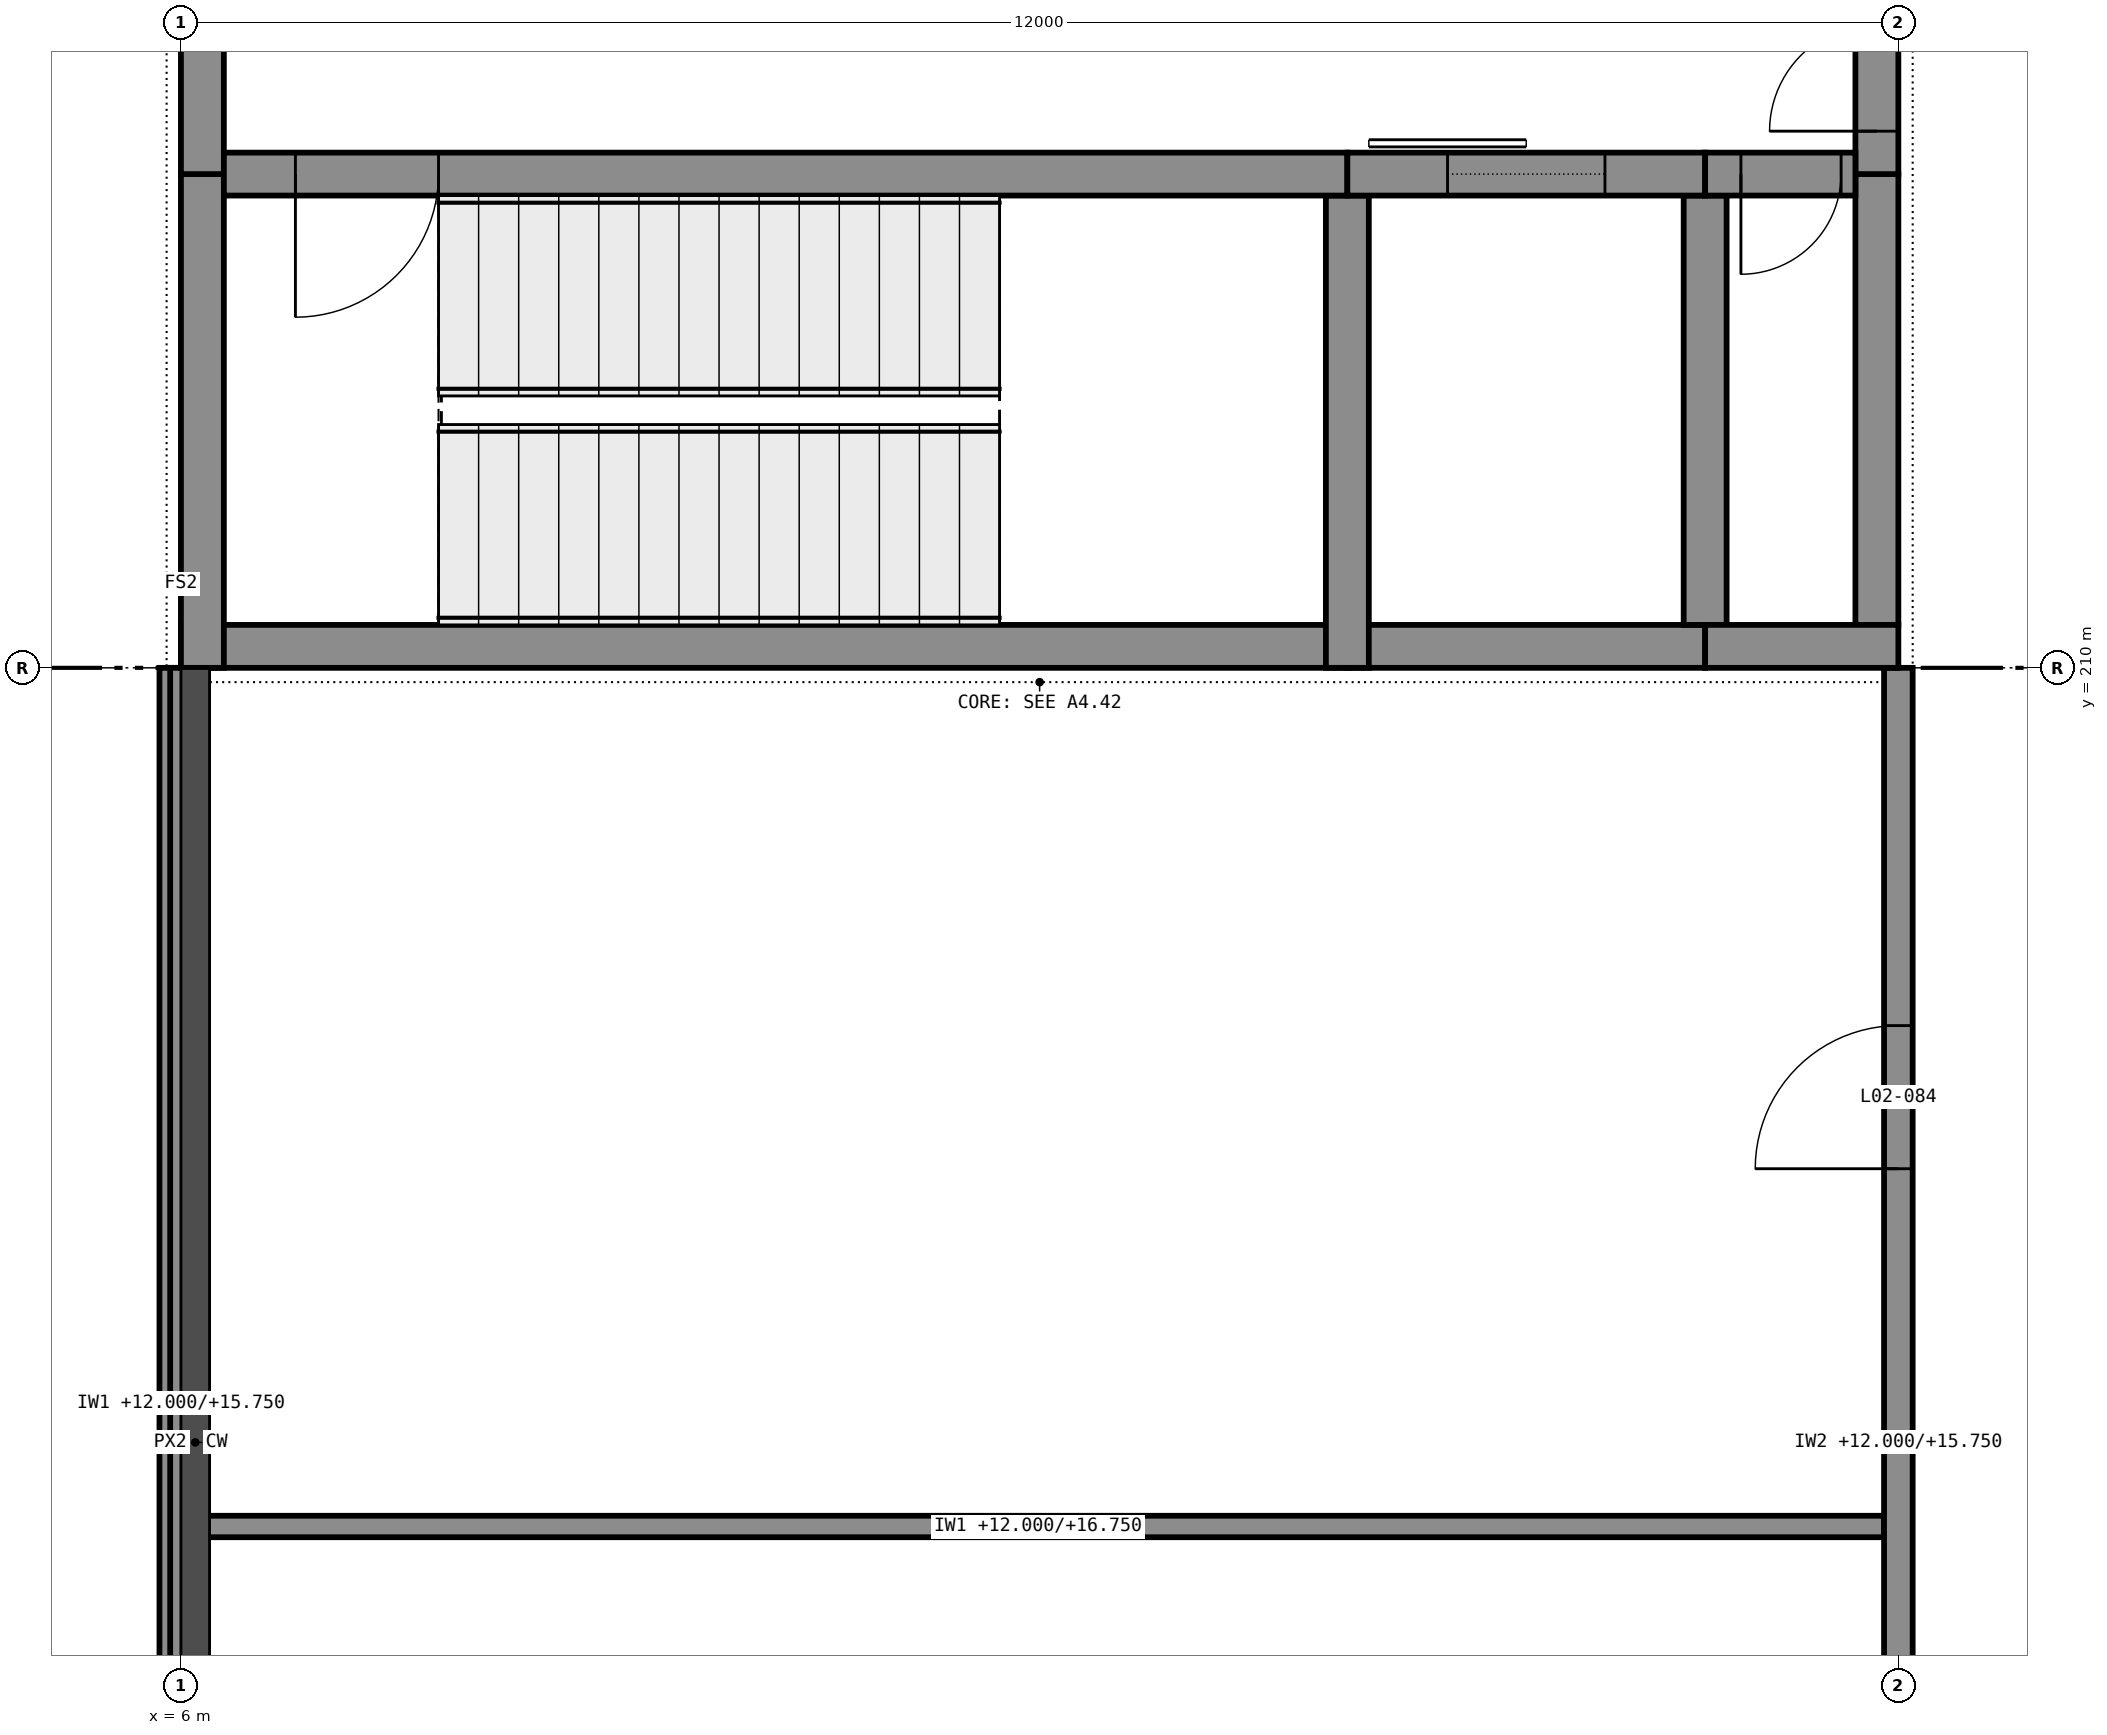
"""IFC4 building model, lengths in metres.
Left out: names, types, materials, properties, quantities, classifications, styles, units other than length and angle.
Written with IfcOpenShell. Run it as: python <this file> out.ifc"""

import sys

from ifc_helpers import new_model, si_unit, direction, frame, frame_2d, origin, place, context, subcontext, project, spatial, rectangle, extrude, element, fill, save


model = new_model("IFC4")
c1 = context("Model", 3, precision=1e-05, world=origin(), true_north=direction((0.0, 1.0)))
c2 = subcontext(c1, "Body", "Model", "MODEL_VIEW")
j1 = project(units=[si_unit("LENGTHUNIT", "METRE"), si_unit("PLANEANGLEUNIT", "RADIAN")], contexts=[c1])
p1 = place(None, origin())
s1 = spatial("IfcSite", under=j1, at=p1, CompositionType="ELEMENT")
p2 = place(p1, origin())
s2 = spatial("IfcBuilding", under=s1, at=p2, CompositionType="ELEMENT")
p3 = place(p2, frame((0.0, 0.0, 12.0)))
s3 = spatial("IfcBuildingStorey", under=s2, at=p3, CompositionType="ELEMENT", Elevation=12.0)
p4 = place(p3, frame((6.0, 210.15, 0.0), z_axis=(0.0, 0.0, 1.0), x_axis=(1.0, 0.0, 0.0)))
e1 = element("IfcWall", 1, at=p4, inside=s3, PredefinedType="SHEAR", context=c2, shape_type="SweptSolid", body=[
    extrude(rectangle(XDim=8.15, YDim=0.3, at=frame_2d((4.075, 0.0))), origin(), (0.0, 0.0, 1.0), 4.75),
])
p5 = place(p3, frame((14.15, 210.15, 0.0), z_axis=(0.0, 0.0, 1.0), x_axis=(1.0, 0.0, 0.0)))
e2 = element("IfcWall", 2, at=p5, inside=s3, PredefinedType="SHEAR", context=c2, shape_type="SweptSolid", body=[
    extrude(rectangle(XDim=2.5, YDim=0.3, at=frame_2d((1.25, 0.0))), origin(), (0.0, 0.0, 1.0), 4.75),
])
p6 = place(p3, frame((16.65, 210.15, 0.0), z_axis=(0.0, 0.0, 1.0), x_axis=(1.0, 0.0, 0.0)))
e3 = element("IfcWall", 3, at=p6, inside=s3, PredefinedType="SHEAR", context=c2, shape_type="SweptSolid", body=[
    extrude(rectangle(XDim=1.35, YDim=0.3, at=frame_2d((0.675, 0.0))), origin(), (0.0, 0.0, 1.0), 4.75),
])
p7 = place(p3, frame((6.3, 213.45, 0.0), z_axis=(0.0, 0.0, 1.0), x_axis=(1.0, 0.0, 0.0)))
e4 = element("IfcWall", 4, at=p7, inside=s3, PredefinedType="SHEAR", context=c2, shape_type="SweptSolid", body=[
    extrude(rectangle(XDim=7.85, YDim=0.3, at=frame_2d((3.925, 0.0))), origin(), (0.0, 0.0, 1.0), 4.75),
])
p8 = place(p7, frame((0.5, 0.0, 0.0)))
e5 = element("IfcOpeningElement", 5, at=p8, cuts=e4, PredefinedType="OPENING", context=c2, shape_type="SweptSolid", body=[
    extrude(rectangle(XDim=1.0, YDim=2.1, at=frame_2d((0.5, 1.05))), frame((0.0, 0.16, 0.0), z_axis=(0.0, -1.0, 0.0), x_axis=(1.0, 0.0, 0.0)), (0.0, 0.0, 1.0), 0.32),
])
p9 = place(p3, frame((14.15, 213.45, 0.0), z_axis=(0.0, 0.0, 1.0), x_axis=(1.0, 0.0, 0.0)))
e6 = element("IfcWall", 6, at=p9, inside=s3, PredefinedType="SHEAR", context=c2, shape_type="SweptSolid", body=[
    extrude(rectangle(XDim=2.5, YDim=0.3, at=frame_2d((1.25, 0.0))), origin(), (0.0, 0.0, 1.0), 4.75),
])
p10 = place(p9, frame((0.7, 0.0, 0.0)))
e7 = element("IfcOpeningElement", 7, at=p10, cuts=e6, PredefinedType="OPENING", context=c2, shape_type="SweptSolid", body=[
    extrude(rectangle(XDim=1.1, YDim=2.1, at=frame_2d((0.55, 1.05))), frame((0.0, 0.16, 0.0), z_axis=(0.0, -1.0, 0.0), x_axis=(1.0, 0.0, 0.0)), (0.0, 0.0, 1.0), 0.32),
])
p11 = place(p3, frame((16.65, 213.45, 0.0), z_axis=(0.0, 0.0, 1.0), x_axis=(1.0, 0.0, 0.0)))
e8 = element("IfcWall", 8, at=p11, inside=s3, PredefinedType="SHEAR", context=c2, shape_type="SweptSolid", body=[
    extrude(rectangle(XDim=1.05, YDim=0.3, at=frame_2d((0.525, 0.0))), origin(), (0.0, 0.0, 1.0), 4.75),
])
p12 = place(p11, frame((0.25, 0.0, 0.0)))
e9 = element("IfcOpeningElement", 9, at=p12, cuts=e8, PredefinedType="OPENING", context=c2, shape_type="SweptSolid", body=[
    extrude(rectangle(XDim=0.7, YDim=2.1, at=frame_2d((0.35, 1.05))), frame((0.0, 0.16, 0.0), z_axis=(0.0, -1.0, 0.0), x_axis=(1.0, 0.0, 0.0)), (0.0, 0.0, 1.0), 0.32),
])
p13 = place(p3, frame((6.15, 210.0, 0.0), z_axis=(0.0, 0.0, 1.0), x_axis=(0.0, 1.0, 0.0)))
e10 = element("IfcWall", 10, at=p13, inside=s3, PredefinedType="SHEAR", context=c2, shape_type="SweptSolid", body=[
    extrude(rectangle(XDim=3.45, YDim=0.3, at=frame_2d((1.725, 0.0))), origin(), (0.0, 0.0, 1.0), 4.75),
])
p14 = place(p3, frame((6.15, 213.45, 0.0), z_axis=(0.0, 0.0, 1.0), x_axis=(0.0, 1.0, 0.0)))
e11 = element("IfcWall", 11, at=p14, inside=s3, PredefinedType="SHEAR", context=c2, shape_type="SweptSolid", body=[
    extrude(rectangle(XDim=5.1, YDim=0.3, at=frame_2d((2.55, 0.0))), origin(), (0.0, 0.0, 1.0), 4.75),
])
p15 = place(p3, frame((17.85, 210.3, 0.0), z_axis=(0.0, 0.0, 1.0), x_axis=(0.0, 1.0, 0.0)))
e12 = element("IfcWall", 12, at=p15, inside=s3, PredefinedType="SHEAR", context=c2, shape_type="SweptSolid", body=[
    extrude(rectangle(XDim=3.15, YDim=0.3, at=frame_2d((1.575, 0.0))), origin(), (0.0, 0.0, 1.0), 4.75),
])
p16 = place(p3, frame((17.85, 213.45, 0.0), z_axis=(0.0, 0.0, 1.0), x_axis=(0.0, 1.0, 0.0)))
e13 = element("IfcWall", 13, at=p16, inside=s3, PredefinedType="SHEAR", context=c2, shape_type="SweptSolid", body=[
    extrude(rectangle(XDim=5.1, YDim=0.3, at=frame_2d((2.55, 0.0))), origin(), (0.0, 0.0, 1.0), 4.75),
])
p17 = place(p16, frame((0.3, 0.0, 0.0)))
e14 = element("IfcOpeningElement", 14, at=p17, cuts=e13, PredefinedType="OPENING", context=c2, shape_type="SweptSolid", body=[
    extrude(rectangle(XDim=1.5, YDim=2.1, at=frame_2d((0.75, 1.05))), frame((0.0, 0.16, 0.0), z_axis=(0.0, -1.0, 0.0), x_axis=(1.0, 0.0, 0.0)), (0.0, 0.0, 1.0), 0.32),
])
p18 = place(p3, frame((14.15, 210.0, 0.0), z_axis=(0.0, 0.0, 1.0), x_axis=(0.0, 1.0, 0.0)))
e15 = element("IfcWall", 15, at=p18, inside=s3, PredefinedType="SHEAR", context=c2, shape_type="SweptSolid", body=[
    extrude(rectangle(XDim=3.3, YDim=0.3, at=frame_2d((1.65, 0.0))), origin(), (0.0, 0.0, 1.0), 4.75),
])
p19 = place(p3, frame((16.65, 210.3, 0.0), z_axis=(0.0, 0.0, 1.0), x_axis=(0.0, 1.0, 0.0)))
e16 = element("IfcWall", 16, at=p19, inside=s3, PredefinedType="SHEAR", context=c2, shape_type="SweptSolid", body=[
    extrude(rectangle(XDim=3.0, YDim=0.3, at=frame_2d((1.5, 0.0))), origin(), (0.0, 0.0, 1.0), 4.75),
])
p20 = place(p3, frame((5.925, 210.0, 4.75), z_axis=(0.0, 0.0, 1.0), x_axis=(0.0, -1.0, 0.0)))
e17 = element("IfcWall", 17, at=p20, inside=s3, PredefinedType="STANDARD", context=c2, shape_type="SweptSolid", body=[
    extrude(rectangle(XDim=11.5, YDim=0.15, at=frame_2d((5.75, 0.0))), origin(), (0.0, 0.0, 1.0), 0.25),
])
p21 = place(p3, frame((6.075, 204.0, 0.0), z_axis=(0.0, 0.0, 1.0), x_axis=(1.0, 0.0, 0.0)))
e18 = element("IfcWall", 18, at=p21, inside=s3, PredefinedType="PARTITIONING", context=c2, shape_type="SweptSolid", body=[
    extrude(rectangle(XDim=11.825, YDim=0.15, at=frame_2d((5.913, 0.0))), origin(), (0.0, 0.0, 1.0), 4.75),
])
p22 = place(p3, frame((6.0, 162.0, 0.0), z_axis=(0.0, 0.0, 1.0), x_axis=(0.0, 1.0, 0.0)))
e19 = element("IfcWall", 19, at=p22, inside=s3, PredefinedType="PARTITIONING", context=c2, shape_type="SweptSolid", body=[
    extrude(rectangle(XDim=48.0, YDim=0.15, at=frame_2d((24.0, 0.0))), origin(), (0.0, 0.0, 1.0), 3.75),
])
p23 = place(p3, frame((18.0, 162.0, 0.0), z_axis=(0.0, 0.0, 1.0), x_axis=(0.0, 1.0, 0.0)))
e20 = element("IfcWall", 20, at=p23, inside=s3, PredefinedType="PARTITIONING", context=c2, shape_type="SweptSolid", body=[
    extrude(rectangle(XDim=48.0, YDim=0.2, at=frame_2d((24.0, 0.0))), origin(), (0.0, 0.0, 1.0), 3.75),
])
p24 = place(p23, frame((2.5, 0.0, 0.0)))
e21 = element("IfcOpeningElement", 21, at=p24, cuts=e20, PredefinedType="OPENING", context=c2, shape_type="SweptSolid", body=[
    extrude(rectangle(XDim=1.0, YDim=2.1, at=frame_2d((0.5, 1.05))), frame((0.0, 0.11, 0.0), z_axis=(0.0, -1.0, 0.0), x_axis=(1.0, 0.0, 0.0)), (0.0, 0.0, 1.0), 0.22),
])
p25 = place(p23, frame((8.5, 0.0, 0.0)))
e22 = element("IfcOpeningElement", 22, at=p25, cuts=e20, PredefinedType="OPENING", context=c2, shape_type="SweptSolid", body=[
    extrude(rectangle(XDim=1.0, YDim=2.1, at=frame_2d((0.5, 1.05))), frame((0.0, 0.11, 0.0), z_axis=(0.0, -1.0, 0.0), x_axis=(1.0, 0.0, 0.0)), (0.0, 0.0, 1.0), 0.22),
])
p26 = place(p23, frame((14.5, 0.0, 0.0)))
e23 = element("IfcOpeningElement", 23, at=p26, cuts=e20, PredefinedType="OPENING", context=c2, shape_type="SweptSolid", body=[
    extrude(rectangle(XDim=1.0, YDim=2.1, at=frame_2d((0.5, 1.05))), frame((0.0, 0.11, 0.0), z_axis=(0.0, -1.0, 0.0), x_axis=(1.0, 0.0, 0.0)), (0.0, 0.0, 1.0), 0.22),
])
p27 = place(p23, frame((20.5, 0.0, 0.0)))
e24 = element("IfcOpeningElement", 24, at=p27, cuts=e20, PredefinedType="OPENING", context=c2, shape_type="SweptSolid", body=[
    extrude(rectangle(XDim=1.0, YDim=2.1, at=frame_2d((0.5, 1.05))), frame((0.0, 0.11, 0.0), z_axis=(0.0, -1.0, 0.0), x_axis=(1.0, 0.0, 0.0)), (0.0, 0.0, 1.0), 0.22),
])
p28 = place(p23, frame((26.5, 0.0, 0.0)))
e25 = element("IfcOpeningElement", 25, at=p28, cuts=e20, PredefinedType="OPENING", context=c2, shape_type="SweptSolid", body=[
    extrude(rectangle(XDim=1.0, YDim=2.1, at=frame_2d((0.5, 1.05))), frame((0.0, 0.11, 0.0), z_axis=(0.0, -1.0, 0.0), x_axis=(1.0, 0.0, 0.0)), (0.0, 0.0, 1.0), 0.22),
])
p29 = place(p23, frame((32.5, 0.0, 0.0)))
e26 = element("IfcOpeningElement", 26, at=p29, cuts=e20, PredefinedType="OPENING", context=c2, shape_type="SweptSolid", body=[
    extrude(rectangle(XDim=1.0, YDim=2.1, at=frame_2d((0.5, 1.05))), frame((0.0, 0.11, 0.0), z_axis=(0.0, -1.0, 0.0), x_axis=(1.0, 0.0, 0.0)), (0.0, 0.0, 1.0), 0.22),
])
p30 = place(p23, frame((38.5, 0.0, 0.0)))
e27 = element("IfcOpeningElement", 27, at=p30, cuts=e20, PredefinedType="OPENING", context=c2, shape_type="SweptSolid", body=[
    extrude(rectangle(XDim=1.0, YDim=2.1, at=frame_2d((0.5, 1.05))), frame((0.0, 0.11, 0.0), z_axis=(0.0, -1.0, 0.0), x_axis=(1.0, 0.0, 0.0)), (0.0, 0.0, 1.0), 0.22),
])
p31 = place(p23, frame((44.5, 0.0, 0.0)))
e28 = element("IfcOpeningElement", 28, at=p31, cuts=e20, PredefinedType="OPENING", context=c2, shape_type="SweptSolid", body=[
    extrude(rectangle(XDim=1.0, YDim=2.1, at=frame_2d((0.5, 1.05))), frame((0.0, 0.11, 0.0), z_axis=(0.0, -1.0, 0.0), x_axis=(1.0, 0.0, 0.0)), (0.0, 0.0, 1.0), 0.22),
])
p32 = place(p31, origin())
e29 = element("IfcDoor", 29, at=p32, inside=s3, OperationType="SINGLE_SWING_RIGHT", PredefinedType="DOOR", context=c2, shape_type="SweptSolid", body=[
    extrude(rectangle(XDim=1.0, YDim=2.1, at=frame_2d((0.5, 1.05))), frame((0.0, 0.025, 0.0), z_axis=(0.0, -1.0, 0.0), x_axis=(1.0, 0.0, 0.0)), (0.0, 0.0, 1.0), 0.05),
])
fill(e28, e29)
p33 = place(p8, frame((1.0, 0.0, 0.0), z_axis=(0.0, 0.0, 1.0), x_axis=(-1.0, 0.0, 0.0)))
e30 = element("IfcDoor", 30, at=p33, inside=s3, OperationType="SINGLE_SWING_LEFT", PredefinedType="DOOR", context=c2, shape_type="SweptSolid", body=[
    extrude(rectangle(XDim=1.0, YDim=2.1, at=frame_2d((0.5, 1.05))), frame((0.0, 0.025, 0.0), z_axis=(0.0, -1.0, 0.0), x_axis=(1.0, 0.0, 0.0)), (0.0, 0.0, 1.0), 0.05),
])
fill(e5, e30)
p34 = place(p10, origin())
e31 = element("IfcDoor", 31, at=p34, inside=s3, OperationType="SLIDING_TO_LEFT", PredefinedType="DOOR", context=c2, shape_type="SweptSolid", body=[
    extrude(rectangle(XDim=1.1, YDim=2.1, at=frame_2d((0.55, 1.05))), frame((0.0, 0.025, 0.0), z_axis=(0.0, -1.0, 0.0), x_axis=(1.0, 0.0, 0.0)), (0.0, 0.0, 1.0), 0.05),
])
fill(e7, e31)
p35 = place(p12, frame((0.7, 0.0, 0.0), z_axis=(0.0, 0.0, 1.0), x_axis=(-1.0, 0.0, 0.0)))
e32 = element("IfcDoor", 32, at=p35, inside=s3, OperationType="SINGLE_SWING_LEFT", PredefinedType="DOOR", context=c2, shape_type="SweptSolid", body=[
    extrude(rectangle(XDim=0.7, YDim=2.1, at=frame_2d((0.35, 1.05))), frame((0.0, 0.025, 0.0), z_axis=(0.0, -1.0, 0.0), x_axis=(1.0, 0.0, 0.0)), (0.0, 0.0, 1.0), 0.05),
])
fill(e9, e32)
p36 = place(p17, origin())
e33 = element("IfcDoor", 33, at=p36, inside=s3, OperationType="DOUBLE_DOOR_SINGLE_SWING", PredefinedType="DOOR", context=c2, shape_type="SweptSolid", body=[
    extrude(rectangle(XDim=1.5, YDim=2.1, at=frame_2d((0.75, 1.05))), frame((0.0, 0.025, 0.0), z_axis=(0.0, -1.0, 0.0), x_axis=(1.0, 0.0, 0.0)), (0.0, 0.0, 1.0), 0.05),
])
fill(e14, e33)
save(model, sys.argv[1])
